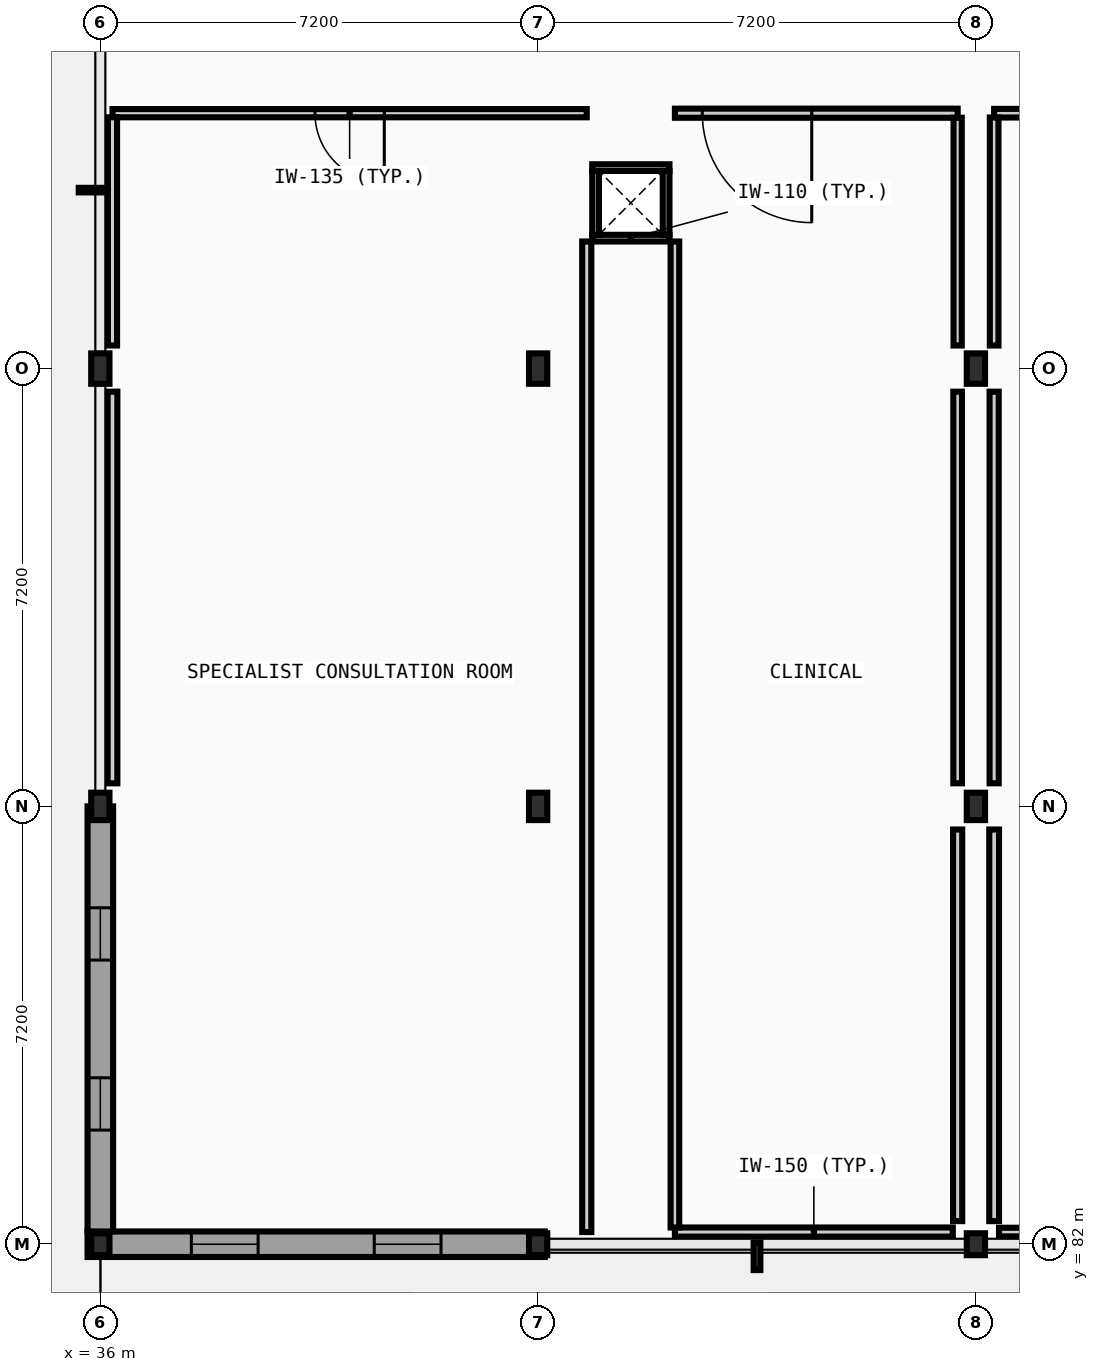
"""IFC4 building model, lengths in metres.
Left out: names, types, materials, properties, quantities, classifications, styles, units other than length and angle.
Written with IfcOpenShell. Run it as: python <this file> out.ifc"""

import sys

from ifc_helpers import new_model, si_unit, direction, frame, frame_2d, origin, origin_2d, place, context, subcontext, project, spatial, rectangle, i_section, extrude, element, fill, save


model = new_model("IFC4")
c1 = context("Model", 3, precision=1e-05, world=origin(), true_north=direction((0.0, 1.0)))
c2 = subcontext(c1, "Body", "Model", "MODEL_VIEW")
j1 = project(units=[si_unit("LENGTHUNIT", "METRE"), si_unit("PLANEANGLEUNIT", "RADIAN")], contexts=[c1])
p1 = place(None, origin())
s1 = spatial("IfcSite", under=j1, at=p1, CompositionType="ELEMENT")
p2 = place(p1, origin())
s2 = spatial("IfcBuilding", under=s1, at=p2, CompositionType="ELEMENT")
p3 = place(p2, origin())
s3 = spatial("IfcBuildingStorey", under=s2, at=p3, CompositionType="ELEMENT", Elevation=0.0)
p4 = place(p3, frame((36.0, 82.0, 0.0), z_axis=(0.0, 0.0, 1.0), x_axis=(1.0, 0.0, 0.0)))
e1 = element("IfcColumn", 1, at=p4, inside=s3, PredefinedType="COLUMN", context=c2, shape_type="SweptSolid", body=[
    extrude(i_section(OverallWidth=0.3, OverallDepth=0.36, WebThickness=0.012, FlangeThickness=0.022, FilletRadius=0.027, at=origin_2d()), origin(), (0.0, 0.0, 1.0), 5.2),
])
p5 = place(p3, frame((36.0, 89.2, 0.0), z_axis=(0.0, 0.0, 1.0), x_axis=(1.0, 0.0, 0.0)))
e2 = element("IfcColumn", 2, at=p5, inside=s3, PredefinedType="COLUMN", context=c2, shape_type="SweptSolid", body=[
    extrude(i_section(OverallWidth=0.3, OverallDepth=0.45, WebThickness=0.014, FlangeThickness=0.026, FilletRadius=0.027, at=origin_2d()), origin(), (0.0, 0.0, 1.0), 5.2),
])
p6 = place(p3, frame((36.0, 96.4, 0.0), z_axis=(0.0, 0.0, 1.0), x_axis=(1.0, 0.0, 0.0)))
e3 = element("IfcColumn", 3, at=p6, inside=s3, PredefinedType="COLUMN", context=c2, shape_type="SweptSolid", body=[
    extrude(i_section(OverallWidth=0.3, OverallDepth=0.5, WebThickness=0.014, FlangeThickness=0.028, FilletRadius=0.027, at=origin_2d()), origin(), (0.0, 0.0, 1.0), 5.2),
])
p7 = place(p3, frame((43.2, 82.0, 0.0), z_axis=(0.0, 0.0, 1.0), x_axis=(1.0, 0.0, 0.0)))
e4 = element("IfcColumn", 4, at=p7, inside=s3, PredefinedType="COLUMN", context=c2, shape_type="SweptSolid", body=[
    extrude(i_section(OverallWidth=0.3, OverallDepth=0.36, WebThickness=0.012, FlangeThickness=0.022, FilletRadius=0.027, at=origin_2d()), origin(), (0.0, 0.0, 1.0), 5.2),
])
p8 = place(p3, frame((43.2, 89.2, 0.0), z_axis=(0.0, 0.0, 1.0), x_axis=(1.0, 0.0, 0.0)))
e5 = element("IfcColumn", 5, at=p8, inside=s3, PredefinedType="COLUMN", context=c2, shape_type="SweptSolid", body=[
    extrude(i_section(OverallWidth=0.3, OverallDepth=0.45, WebThickness=0.014, FlangeThickness=0.026, FilletRadius=0.027, at=origin_2d()), origin(), (0.0, 0.0, 1.0), 5.2),
])
p9 = place(p3, frame((43.2, 96.4, 0.0), z_axis=(0.0, 0.0, 1.0), x_axis=(1.0, 0.0, 0.0)))
e6 = element("IfcColumn", 6, at=p9, inside=s3, PredefinedType="COLUMN", context=c2, shape_type="SweptSolid", body=[
    extrude(i_section(OverallWidth=0.3, OverallDepth=0.5, WebThickness=0.014, FlangeThickness=0.028, FilletRadius=0.027, at=origin_2d()), origin(), (0.0, 0.0, 1.0), 5.2),
])
p10 = place(p3, frame((50.4, 82.0, 0.0), z_axis=(0.0, 0.0, 1.0), x_axis=(1.0, 0.0, 0.0)))
e7 = element("IfcColumn", 7, at=p10, inside=s3, PredefinedType="COLUMN", context=c2, shape_type="SweptSolid", body=[
    extrude(i_section(OverallWidth=0.3, OverallDepth=0.36, WebThickness=0.012, FlangeThickness=0.022, FilletRadius=0.027, at=origin_2d()), origin(), (0.0, 0.0, 1.0), 5.2),
])
p11 = place(p3, frame((50.4, 89.2, 0.0), z_axis=(0.0, 0.0, 1.0), x_axis=(1.0, 0.0, 0.0)))
e8 = element("IfcColumn", 8, at=p11, inside=s3, PredefinedType="COLUMN", context=c2, shape_type="SweptSolid", body=[
    extrude(i_section(OverallWidth=0.3, OverallDepth=0.45, WebThickness=0.014, FlangeThickness=0.026, FilletRadius=0.027, at=origin_2d()), origin(), (0.0, 0.0, 1.0), 5.2),
])
p12 = place(p3, frame((50.4, 96.4, 0.0), z_axis=(0.0, 0.0, 1.0), x_axis=(1.0, 0.0, 0.0)))
e9 = element("IfcColumn", 9, at=p12, inside=s3, PredefinedType="COLUMN", context=c2, shape_type="SweptSolid", body=[
    extrude(i_section(OverallWidth=0.3, OverallDepth=0.5, WebThickness=0.014, FlangeThickness=0.028, FilletRadius=0.027, at=origin_2d()), origin(), (0.0, 0.0, 1.0), 5.2),
])
p13 = place(p3, frame((35.79, 82.0, 0.0), z_axis=(0.0, 0.0, 1.0), x_axis=(1.0, 0.0, 0.0)))
e10 = element("IfcWall", 10, at=p13, inside=s3, PredefinedType="STANDARD", context=c2, shape_type="SweptSolid", body=[
    extrude(rectangle(XDim=7.52, YDim=0.42, at=frame_2d((3.76, 0.0))), origin(), (0.0, 0.0, 1.0), 4.665),
])
p14 = place(p13, frame((1.707, 0.0, 0.95)))
e11 = element("IfcOpeningElement", 11, at=p14, cuts=e10, PredefinedType="OPENING", context=c2, shape_type="SweptSolid", body=[
    extrude(rectangle(XDim=1.098, YDim=1.332, at=frame_2d((0.549, 0.666))), frame((0.0, 0.22, 0.0), z_axis=(0.0, -1.0, 0.0), x_axis=(1.0, 0.0, 0.0)), (0.0, 0.0, 1.0), 0.44),
])
p15 = place(p13, frame((4.715, 0.0, 0.95)))
e12 = element("IfcOpeningElement", 12, at=p15, cuts=e10, PredefinedType="OPENING", context=c2, shape_type="SweptSolid", body=[
    extrude(rectangle(XDim=1.098, YDim=1.332, at=frame_2d((0.549, 0.666))), frame((0.0, 0.22, 0.0), z_axis=(0.0, -1.0, 0.0), x_axis=(1.0, 0.0, 0.0)), (0.0, 0.0, 1.0), 0.44),
])
p16 = place(p3, frame((36.0, 89.2, 0.0), z_axis=(0.0, 0.0, 1.0), x_axis=(0.0, -1.0, 0.0)))
e13 = element("IfcWall", 13, at=p16, inside=s3, PredefinedType="STANDARD", context=c2, shape_type="SweptSolid", body=[
    extrude(rectangle(XDim=6.99, YDim=0.42, at=frame_2d((3.495, 0.0))), origin(), (0.0, 0.0, 1.0), 4.595),
])
p17 = place(p16, frame((1.667, 0.0, 0.95)))
e14 = element("IfcOpeningElement", 14, at=p17, cuts=e13, PredefinedType="OPENING", context=c2, shape_type="SweptSolid", body=[
    extrude(rectangle(XDim=0.86, YDim=1.368, at=frame_2d((0.43, 0.684))), frame((0.0, 0.22, 0.0), z_axis=(0.0, -1.0, 0.0), x_axis=(1.0, 0.0, 0.0)), (0.0, 0.0, 1.0), 0.44),
])
p18 = place(p16, frame((4.463, 0.0, 0.95)))
e15 = element("IfcOpeningElement", 15, at=p18, cuts=e13, PredefinedType="OPENING", context=c2, shape_type="SweptSolid", body=[
    extrude(rectangle(XDim=0.86, YDim=1.368, at=frame_2d((0.43, 0.684))), frame((0.0, 0.22, 0.0), z_axis=(0.0, -1.0, 0.0), x_axis=(1.0, 0.0, 0.0)), (0.0, 0.0, 1.0), 0.44),
])
for number, where, z_axis, x_axis in (
    (16, (44.09, 98.545, 0.0), (0.0, 0.0, 1.0), (1.0, 0.0, 0.0)),
    (17, (44.09, 99.705, 0.0), (0.0, 0.0, 1.0), (1.0, 0.0, 0.0)),
):
    element("IfcWall", number, at=place(p3, frame(where, z_axis=z_axis, x_axis=x_axis)), inside=s3, PredefinedType="PARTITIONING", context=c2, shape_type="SweptSolid", body=[
        extrude(rectangle(XDim=1.27, YDim=0.11, at=frame_2d((0.635, 0.0))), origin(), (0.0, 0.0, 1.0), 4.97),
    ])
for number, where, z_axis, x_axis in (
    (18, (44.145, 98.6, 0.0), (0.0, 0.0, 1.0), (0.0, 1.0, 0.0)),
    (19, (45.305, 98.6, 0.0), (0.0, 0.0, 1.0), (0.0, 1.0, 0.0)),
):
    element("IfcWall", number, at=place(p3, frame(where, z_axis=z_axis, x_axis=x_axis)), inside=s3, PredefinedType="PARTITIONING", context=c2, shape_type="SweptSolid", body=[
        extrude(rectangle(XDim=1.05, YDim=0.11, at=frame_2d((0.525, 0.0))), origin(), (0.0, 0.0, 1.0), 4.97),
    ])
p19 = place(p3, frame((45.45, 82.2, 0.0), z_axis=(0.0, 0.0, 1.0), x_axis=(1.0, 0.0, 0.0)))
e20 = element("IfcWall", 20, at=p19, inside=s3, PredefinedType="PARTITIONING", context=c2, shape_type="SweptSolid", body=[
    extrude(rectangle(XDim=4.57, YDim=0.15, at=frame_2d((2.285, 0.0))), origin(), (0.0, 0.0, 1.0), 4.665),
])
p20 = place(p3, frame((50.78, 82.2, 0.0), z_axis=(0.0, 0.0, 1.0), x_axis=(1.0, 0.0, 0.0)))
e21 = element("IfcWall", 21, at=p20, inside=s3, PredefinedType="PARTITIONING", context=c2, shape_type="SweptSolid", body=[
    extrude(rectangle(XDim=6.44, YDim=0.142, at=frame_2d((3.22, 0.0))), origin(), (0.0, 0.0, 1.0), 4.665),
])
p21 = place(p3, frame((36.2, 100.6, 0.0), z_axis=(0.0, 0.0, 1.0), x_axis=(1.0, 0.0, 0.0)))
e22 = element("IfcWall", 22, at=p21, inside=s3, PredefinedType="PARTITIONING", context=c2, shape_type="SweptSolid", body=[
    extrude(rectangle(XDim=7.8, YDim=0.135, at=frame_2d((3.9, 0.0))), origin(), (0.0, 0.0, 1.0), 4.97),
])
p22 = place(p21, frame((3.33, 0.0, 0.0)))
e23 = element("IfcOpeningElement", 23, at=p22, cuts=e22, PredefinedType="OPENING", context=c2, shape_type="SweptSolid", body=[
    extrude(rectangle(XDim=1.14, YDim=2.096, at=frame_2d((0.57, 1.048))), frame((0.0, 0.078, 0.0), z_axis=(0.0, -1.0, 0.0), x_axis=(1.0, 0.0, 0.0)), (0.0, 0.0, 1.0), 0.155),
])
p23 = place(p3, frame((45.45, 100.6, 0.0), z_axis=(0.0, 0.0, 1.0), x_axis=(1.0, 0.0, 0.0)))
e24 = element("IfcWall", 24, at=p23, inside=s3, PredefinedType="PARTITIONING", context=c2, shape_type="SweptSolid", body=[
    extrude(rectangle(XDim=4.65, YDim=0.15, at=frame_2d((2.325, 0.0))), origin(), (0.0, 0.0, 1.0), 4.97),
])
p24 = place(p23, frame((0.45, 0.0, 0.0)))
e25 = element("IfcOpeningElement", 25, at=p24, cuts=e24, PredefinedType="OPENING", context=c2, shape_type="SweptSolid", body=[
    extrude(rectangle(XDim=1.8, YDim=2.3, at=frame_2d((0.9, 1.15))), frame((0.0, 0.085, 0.0), z_axis=(0.0, -1.0, 0.0), x_axis=(1.0, 0.0, 0.0)), (0.0, 0.0, 1.0), 0.17),
])
p25 = place(p3, frame((50.7, 100.6, 0.0), z_axis=(0.0, 0.0, 1.0), x_axis=(1.0, 0.0, 0.0)))
e26 = element("IfcWall", 26, at=p25, inside=s3, PredefinedType="PARTITIONING", context=c2, shape_type="SweptSolid", body=[
    extrude(rectangle(XDim=13.9, YDim=0.142, at=frame_2d((6.95, 0.0))), origin(), (0.0, 0.0, 1.0), 4.97),
])
p26 = place(p25, frame((1.95, 0.0, 0.0)))
e27 = element("IfcOpeningElement", 27, at=p26, cuts=e26, PredefinedType="OPENING", context=c2, shape_type="SweptSolid", body=[
    extrude(rectangle(XDim=1.8, YDim=2.3, at=frame_2d((0.9, 1.15))), frame((0.0, 0.081, 0.0), z_axis=(0.0, -1.0, 0.0), x_axis=(1.0, 0.0, 0.0)), (0.0, 0.0, 1.0), 0.162),
])
p27 = place(p25, frame((9.217, 0.0, 0.0)))
e28 = element("IfcOpeningElement", 28, at=p27, cuts=e26, PredefinedType="OPENING", context=c2, shape_type="SweptSolid", body=[
    extrude(rectangle(XDim=1.166, YDim=2.096, at=frame_2d((0.583, 1.048))), frame((0.0, 0.081, 0.0), z_axis=(0.0, -1.0, 0.0), x_axis=(1.0, 0.0, 0.0)), (0.0, 0.0, 1.0), 0.162),
])
p28 = place(p3, frame((36.2, 89.58, 0.0), z_axis=(0.0, 0.0, 1.0), x_axis=(0.0, 1.0, 0.0)))
e29 = element("IfcWall", 29, at=p28, inside=s3, PredefinedType="PARTITIONING", context=c2, shape_type="SweptSolid", body=[
    extrude(rectangle(XDim=6.44, YDim=0.16, at=frame_2d((3.22, 0.0))), origin(), (0.0, 0.0, 1.0), 4.595),
])
p29 = place(p3, frame((36.2, 96.78, 0.0), z_axis=(0.0, 0.0, 1.0), x_axis=(0.0, 1.0, 0.0)))
e30 = element("IfcWall", 30, at=p29, inside=s3, PredefinedType="PARTITIONING", context=c2, shape_type="SweptSolid", body=[
    extrude(rectangle(XDim=3.752, YDim=0.15, at=frame_2d((1.876, 0.0))), origin(), (0.0, 0.0, 1.0), 4.595),
])
p30 = place(p3, frame((44.0, 82.2, 0.0), z_axis=(0.0, 0.0, 1.0), x_axis=(0.0, 1.0, 0.0)))
e31 = element("IfcWall", 31, at=p30, inside=s3, PredefinedType="PARTITIONING", context=c2, shape_type="SweptSolid", body=[
    extrude(rectangle(XDim=16.29, YDim=0.15, at=frame_2d((8.145, 0.0))), origin(), (0.0, 0.0, 1.0), 4.97),
])
p31 = place(p3, frame((45.45, 82.275, 0.0), z_axis=(0.0, 0.0, 1.0), x_axis=(0.0, 1.0, 0.0)))
e32 = element("IfcWall", 32, at=p31, inside=s3, PredefinedType="PARTITIONING", context=c2, shape_type="SweptSolid", body=[
    extrude(rectangle(XDim=16.215, YDim=0.142, at=frame_2d((8.107, 0.0))), origin(), (0.0, 0.0, 1.0), 4.655),
])
p32 = place(p3, frame((50.1, 82.38, 0.0), z_axis=(0.0, 0.0, 1.0), x_axis=(0.0, 1.0, 0.0)))
e33 = element("IfcWall", 33, at=p32, inside=s3, PredefinedType="PARTITIONING", context=c2, shape_type="SweptSolid", body=[
    extrude(rectangle(XDim=6.44, YDim=0.15, at=frame_2d((3.22, 0.0))), origin(), (0.0, 0.0, 1.0), 4.665),
])
p33 = place(p3, frame((50.1, 89.58, 0.0), z_axis=(0.0, 0.0, 1.0), x_axis=(0.0, 1.0, 0.0)))
e34 = element("IfcWall", 34, at=p33, inside=s3, PredefinedType="PARTITIONING", context=c2, shape_type="SweptSolid", body=[
    extrude(rectangle(XDim=6.44, YDim=0.142, at=frame_2d((3.22, 0.0))), origin(), (0.0, 0.0, 1.0), 4.665),
])
p34 = place(p3, frame((50.1, 96.78, 0.0), z_axis=(0.0, 0.0, 1.0), x_axis=(0.0, 1.0, 0.0)))
e35 = element("IfcWall", 35, at=p34, inside=s3, PredefinedType="PARTITIONING", context=c2, shape_type="SweptSolid", body=[
    extrude(rectangle(XDim=3.745, YDim=0.135, at=frame_2d((1.873, 0.0))), origin(), (0.0, 0.0, 1.0), 4.97),
])
p35 = place(p3, frame((50.7, 82.38, 0.0), z_axis=(0.0, 0.0, 1.0), x_axis=(0.0, 1.0, 0.0)))
e36 = element("IfcWall", 36, at=p35, inside=s3, PredefinedType="PARTITIONING", context=c2, shape_type="SweptSolid", body=[
    extrude(rectangle(XDim=6.44, YDim=0.16, at=frame_2d((3.22, 0.0))), origin(), (0.0, 0.0, 1.0), 4.665),
])
p36 = place(p3, frame((50.7, 89.58, 0.0), z_axis=(0.0, 0.0, 1.0), x_axis=(0.0, 1.0, 0.0)))
e37 = element("IfcWall", 37, at=p36, inside=s3, PredefinedType="PARTITIONING", context=c2, shape_type="SweptSolid", body=[
    extrude(rectangle(XDim=6.44, YDim=0.15, at=frame_2d((3.22, 0.0))), origin(), (0.0, 0.0, 1.0), 4.665),
])
p37 = place(p3, frame((50.7, 96.78, 0.0), z_axis=(0.0, 0.0, 1.0), x_axis=(0.0, 1.0, 0.0)))
e38 = element("IfcWall", 38, at=p37, inside=s3, PredefinedType="PARTITIONING", context=c2, shape_type="SweptSolid", body=[
    extrude(rectangle(XDim=3.749, YDim=0.142, at=frame_2d((1.875, 0.0))), origin(), (0.0, 0.0, 1.0), 4.665),
])
p38 = place(p14, origin())
e39 = element("IfcWindow", 39, at=p38, inside=s3, PartitioningType="SINGLE_PANEL", PredefinedType="WINDOW", context=c2, shape_type="SweptSolid", body=[
    extrude(rectangle(XDim=1.098, YDim=1.332, at=frame_2d((0.549, 0.666))), frame((0.0, 0.03, 0.0), z_axis=(0.0, -1.0, 0.0), x_axis=(1.0, 0.0, 0.0)), (0.0, 0.0, 1.0), 0.06),
])
fill(e11, e39)
p39 = place(p15, origin())
e40 = element("IfcWindow", 40, at=p39, inside=s3, PartitioningType="SINGLE_PANEL", PredefinedType="WINDOW", context=c2, shape_type="SweptSolid", body=[
    extrude(rectangle(XDim=1.098, YDim=1.332, at=frame_2d((0.549, 0.666))), frame((0.0, 0.03, 0.0), z_axis=(0.0, -1.0, 0.0), x_axis=(1.0, 0.0, 0.0)), (0.0, 0.0, 1.0), 0.06),
])
fill(e12, e40)
p40 = place(p17, origin())
e41 = element("IfcWindow", 41, at=p40, inside=s3, PartitioningType="SINGLE_PANEL", PredefinedType="WINDOW", context=c2, shape_type="SweptSolid", body=[
    extrude(rectangle(XDim=0.86, YDim=1.368, at=frame_2d((0.43, 0.684))), frame((0.0, 0.03, 0.0), z_axis=(0.0, -1.0, 0.0), x_axis=(1.0, 0.0, 0.0)), (0.0, 0.0, 1.0), 0.06),
])
fill(e14, e41)
p41 = place(p18, origin())
e42 = element("IfcWindow", 42, at=p41, inside=s3, PartitioningType="SINGLE_PANEL", PredefinedType="WINDOW", context=c2, shape_type="SweptSolid", body=[
    extrude(rectangle(XDim=0.86, YDim=1.368, at=frame_2d((0.43, 0.684))), frame((0.0, 0.03, 0.0), z_axis=(0.0, -1.0, 0.0), x_axis=(1.0, 0.0, 0.0)), (0.0, 0.0, 1.0), 0.06),
])
fill(e15, e42)
p42 = place(p24, origin())
e43 = element("IfcDoor", 43, at=p42, inside=s3, OperationType="DOUBLE_DOOR_SINGLE_SWING", PredefinedType="DOOR", context=c2, shape_type="SweptSolid", body=[
    extrude(rectangle(XDim=1.8, YDim=2.3, at=frame_2d((0.9, 1.15))), frame((0.0, 0.025, 0.0), z_axis=(0.0, -1.0, 0.0), x_axis=(1.0, 0.0, 0.0)), (0.0, 0.0, 1.0), 0.05),
])
fill(e25, e43)
p43 = place(p22, origin())
e44 = element("IfcDoor", 44, at=p43, inside=s3, OperationType="SINGLE_SWING_RIGHT", PredefinedType="DOOR", context=c2, shape_type="SweptSolid", body=[
    extrude(rectangle(XDim=1.14, YDim=2.096, at=frame_2d((0.57, 1.048))), frame((0.0, 0.025, 0.0), z_axis=(0.0, -1.0, 0.0), x_axis=(1.0, 0.0, 0.0)), (0.0, 0.0, 1.0), 0.05),
])
fill(e23, e44)
save(model, sys.argv[1])
